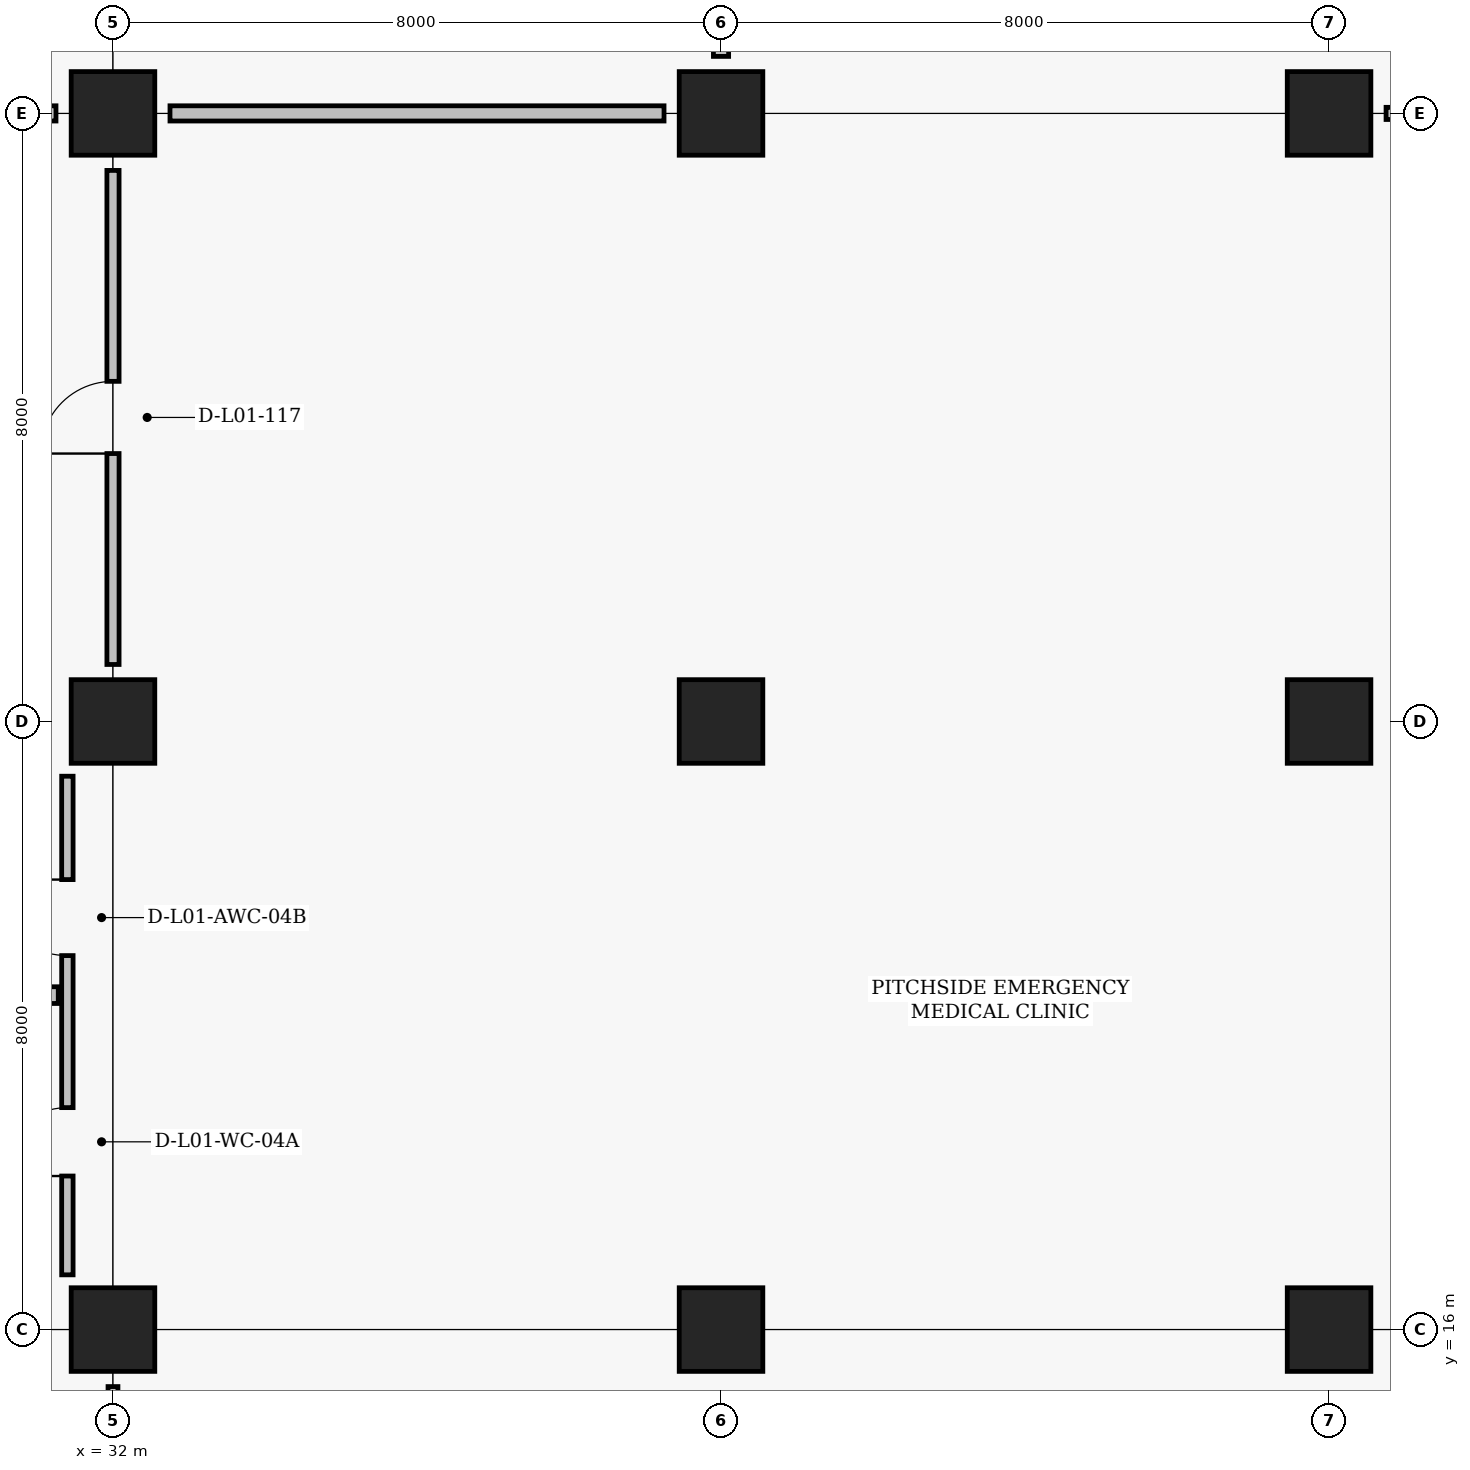
"""IFC4 building model, lengths in metres.
Left out: names, types, materials, properties, quantities, classifications, styles, units other than length and angle.
Written with IfcOpenShell. Run it as: python <this file> out.ifc"""

import sys

from ifc_helpers import new_model, si_unit, direction, frame, frame_2d, origin, origin_2d, place, context, subcontext, project, spatial, rectangle, extrude, element, fill, save


model = new_model("IFC4")
c1 = context("Model", 3, precision=1e-05, world=origin(), true_north=direction((0.0, 1.0)))
c2 = subcontext(c1, "Body", "Model", "MODEL_VIEW")
j1 = project(units=[si_unit("LENGTHUNIT", "METRE"), si_unit("PLANEANGLEUNIT", "RADIAN")], contexts=[c1])
p1 = place(None, origin())
s1 = spatial("IfcSite", under=j1, at=p1, CompositionType="ELEMENT")
p2 = place(p1, origin())
s2 = spatial("IfcBuilding", under=s1, at=p2, CompositionType="ELEMENT")
p3 = place(p2, origin())
s3 = spatial("IfcBuildingStorey", under=s2, at=p3, CompositionType="ELEMENT", Elevation=0.0)
for number, where, z_axis, x_axis in (
    (1, (32.0, 16.0, 0.0), (0.0, 0.0, 1.0), (1.0, 0.0, 0.0)),
    (2, (32.0, 24.0, 0.0), (0.0, 0.0, 1.0), (1.0, 0.0, 0.0)),
    (3, (32.0, 32.0, 0.0), (0.0, 0.0, 1.0), (1.0, 0.0, 0.0)),
    (4, (40.0, 16.0, 0.0), (0.0, 0.0, 1.0), (1.0, 0.0, 0.0)),
    (5, (40.0, 24.0, 0.0), (0.0, 0.0, 1.0), (1.0, 0.0, 0.0)),
    (6, (40.0, 32.0, 0.0), (0.0, 0.0, 1.0), (1.0, 0.0, 0.0)),
    (7, (48.0, 16.0, 0.0), (0.0, 0.0, 1.0), (1.0, 0.0, 0.0)),
    (8, (48.0, 24.0, 0.0), (0.0, 0.0, 1.0), (1.0, 0.0, 0.0)),
    (9, (48.0, 32.0, 0.0), (0.0, 0.0, 1.0), (1.0, 0.0, 0.0)),
):
    element("IfcColumn", number, at=place(p3, frame(where, z_axis=z_axis, x_axis=x_axis)), inside=s3, PredefinedType="COLUMN", context=c2, shape_type="SweptSolid", body=[
        extrude(rectangle(XDim=1.1, YDim=1.1, at=origin_2d()), origin(), (0.0, 0.0, 1.0), 4.8),
    ])
p4 = place(p3, frame((24.75, 32.0, 0.0), z_axis=(0.0, 0.0, 1.0), x_axis=(1.0, 0.0, 0.0)))
e10 = element("IfcWall", 10, at=p4, inside=s3, PredefinedType="PARTITIONING", context=c2, shape_type="SweptSolid", body=[
    extrude(rectangle(XDim=6.5, YDim=0.2, at=frame_2d((3.25, 0.0))), origin(), (0.0, 0.0, 1.0), 3.87),
])
p5 = place(p3, frame((40.0, 32.75, 0.0), z_axis=(0.0, 0.0, 1.0), x_axis=(0.0, 1.0, 0.0)))
e11 = element("IfcWall", 11, at=p5, inside=s3, PredefinedType="PARTITIONING", context=c2, shape_type="SweptSolid", body=[
    extrude(rectangle(XDim=6.5, YDim=0.2, at=frame_2d((3.25, 0.0))), origin(), (0.0, 0.0, 1.0), 3.77),
])
p6 = place(p3, frame((32.75, 32.0, 0.0), z_axis=(0.0, 0.0, 1.0), x_axis=(1.0, 0.0, 0.0)))
e12 = element("IfcWall", 12, at=p6, inside=s3, PredefinedType="PARTITIONING", context=c2, shape_type="SweptSolid", body=[
    extrude(rectangle(XDim=6.5, YDim=0.2, at=frame_2d((3.25, 0.0))), origin(), (0.0, 0.0, 1.0), 3.87),
])
p7 = place(p3, frame((24.72, 20.4, 0.0), z_axis=(0.0, 0.0, 1.0), x_axis=(1.0, 0.0, 0.0)))
e13 = element("IfcWall", 13, at=p7, inside=s3, PredefinedType="PLUMBINGWALL", context=c2, shape_type="SweptSolid", body=[
    extrude(rectangle(XDim=6.56, YDim=0.22, at=frame_2d((3.28, 0.0))), origin(), (0.0, 0.0, 1.0), 4.17),
])
p8 = place(p3, frame((31.4, 16.72, 0.0), z_axis=(0.0, 0.0, 1.0), x_axis=(0.0, 1.0, 0.0)))
e14 = element("IfcWall", 14, at=p8, inside=s3, PredefinedType="PARTITIONING", context=c2, shape_type="SweptSolid", body=[
    extrude(rectangle(XDim=6.56, YDim=0.15, at=frame_2d((3.28, 0.0))), origin(), (0.0, 0.0, 1.0), 3.72),
])
p9 = place(p8, frame((1.3, 0.0, 0.0)))
e15 = element("IfcOpeningElement", 15, at=p9, cuts=e14, PredefinedType="OPENING", context=c2, shape_type="SweptSolid", body=[
    extrude(rectangle(XDim=0.9, YDim=2.1, at=frame_2d((0.45, 1.05))), frame((0.0, 0.085, 0.0), z_axis=(0.0, -1.0, 0.0), x_axis=(1.0, 0.0, 0.0)), (0.0, 0.0, 1.0), 0.17),
])
p10 = place(p8, frame((4.2, 0.0, 0.0)))
e16 = element("IfcOpeningElement", 16, at=p10, cuts=e14, PredefinedType="OPENING", context=c2, shape_type="SweptSolid", body=[
    extrude(rectangle(XDim=1.0, YDim=2.15, at=frame_2d((0.5, 1.075))), frame((0.0, 0.085, 0.0), z_axis=(0.0, -1.0, 0.0), x_axis=(1.0, 0.0, 0.0)), (0.0, 0.0, 1.0), 0.17),
])
p11 = place(p3, frame((32.0, 24.75, 0.0), z_axis=(0.0, 0.0, 1.0), x_axis=(0.0, 1.0, 0.0)))
e17 = element("IfcWall", 17, at=p11, inside=s3, PredefinedType="PARTITIONING", context=c2, shape_type="SweptSolid", body=[
    extrude(rectangle(XDim=6.5, YDim=0.16, at=frame_2d((3.25, 0.0))), origin(), (0.0, 0.0, 1.0), 3.77),
])
p12 = place(p11, frame((2.775, 0.0, 0.0)))
e18 = element("IfcOpeningElement", 18, at=p12, cuts=e17, PredefinedType="OPENING", context=c2, shape_type="SweptSolid", body=[
    extrude(rectangle(XDim=0.95, YDim=2.1, at=frame_2d((0.475, 1.05))), frame((0.0, 0.09, 0.0), z_axis=(0.0, -1.0, 0.0), x_axis=(1.0, 0.0, 0.0)), (0.0, 0.0, 1.0), 0.18),
])
p13 = place(p3, frame((48.75, 32.0, 0.0), z_axis=(0.0, 0.0, 1.0), x_axis=(1.0, 0.0, 0.0)))
e19 = element("IfcWall", 19, at=p13, inside=s3, PredefinedType="PARTITIONING", context=c2, shape_type="SweptSolid", body=[
    extrude(rectangle(XDim=6.5, YDim=0.16, at=frame_2d((3.25, 0.0))), origin(), (0.0, 0.0, 1.0), 3.62),
])
p14 = place(p13, frame((2.775, 0.0, 0.0)))
e20 = element("IfcOpeningElement", 20, at=p14, cuts=e19, PredefinedType="OPENING", context=c2, shape_type="SweptSolid", body=[
    extrude(rectangle(XDim=0.95, YDim=2.1, at=frame_2d((0.475, 1.05))), frame((0.0, 0.09, 0.0), z_axis=(0.0, -1.0, 0.0), x_axis=(1.0, 0.0, 0.0)), (0.0, 0.0, 1.0), 0.18),
])
p15 = place(p3, frame((32.0, 8.75, 0.0), z_axis=(0.0, 0.0, 1.0), x_axis=(0.0, 1.0, 0.0)))
e21 = element("IfcWall", 21, at=p15, inside=s3, PredefinedType="PARTITIONING", context=c2, shape_type="SweptSolid", body=[
    extrude(rectangle(XDim=6.5, YDim=0.13, at=frame_2d((3.25, 0.0))), origin(), (0.0, 0.0, 1.0), 3.81),
])
p16 = place(p15, frame((2.75, 0.0, 0.0)))
e22 = element("IfcOpeningElement", 22, at=p16, cuts=e21, PredefinedType="OPENING", context=c2, shape_type="SweptSolid", body=[
    extrude(rectangle(XDim=1.0, YDim=2.1, at=frame_2d((0.5, 1.05))), frame((0.0, 0.075, 0.0), z_axis=(0.0, -1.0, 0.0), x_axis=(1.0, 0.0, 0.0)), (0.0, 0.0, 1.0), 0.15),
])
p17 = place(p9, origin())
e23 = element("IfcDoor", 23, at=p17, inside=s3, OperationType="SINGLE_SWING_LEFT", PredefinedType="DOOR", context=c2, shape_type="SweptSolid", body=[
    extrude(rectangle(XDim=0.9, YDim=2.1, at=frame_2d((0.45, 1.05))), frame((0.0, 0.025, 0.0), z_axis=(0.0, -1.0, 0.0), x_axis=(1.0, 0.0, 0.0)), (0.0, 0.0, 1.0), 0.05),
])
fill(e15, e23)
p18 = place(p10, origin())
e24 = element("IfcDoor", 24, at=p18, inside=s3, OperationType="SINGLE_SWING_RIGHT", PredefinedType="DOOR", context=c2, shape_type="SweptSolid", body=[
    extrude(rectangle(XDim=1.0, YDim=2.15, at=frame_2d((0.5, 1.075))), frame((0.0, 0.025, 0.0), z_axis=(0.0, -1.0, 0.0), x_axis=(1.0, 0.0, 0.0)), (0.0, 0.0, 1.0), 0.05),
])
fill(e16, e24)
p19 = place(p12, origin())
e25 = element("IfcDoor", 25, at=p19, inside=s3, OperationType="SINGLE_SWING_LEFT", PredefinedType="DOOR", context=c2, shape_type="SweptSolid", body=[
    extrude(rectangle(XDim=0.95, YDim=2.1, at=frame_2d((0.475, 1.05))), frame((0.0, 0.025, 0.0), z_axis=(0.0, -1.0, 0.0), x_axis=(1.0, 0.0, 0.0)), (0.0, 0.0, 1.0), 0.05),
])
fill(e18, e25)
save(model, sys.argv[1])
